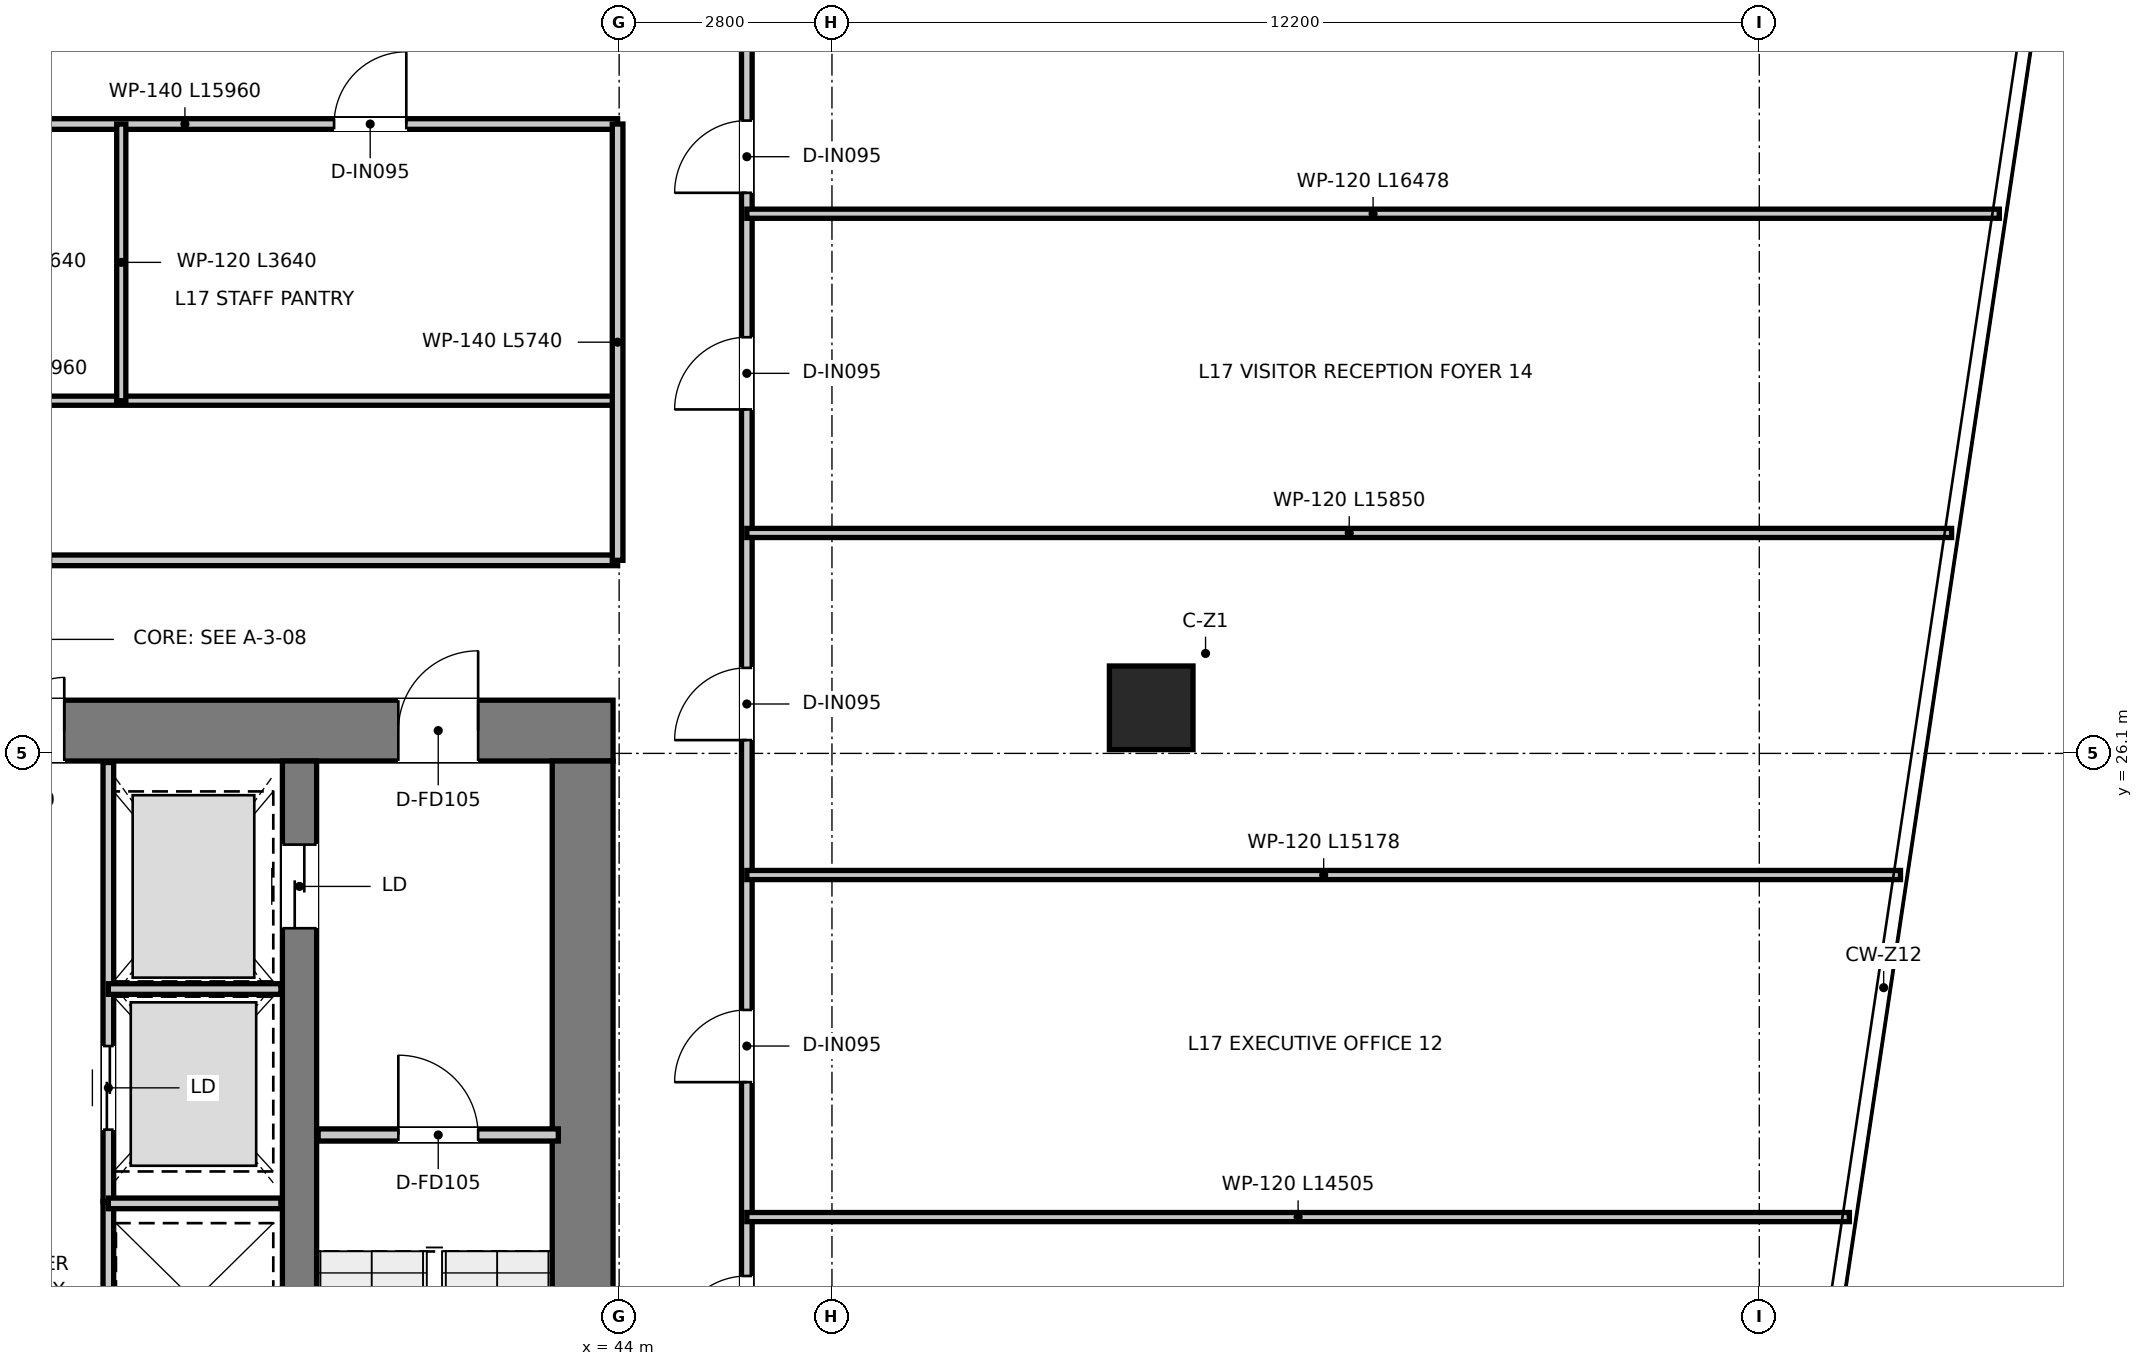
"""IFC4 building model, lengths in metres.
Left out: names, types, materials, properties, quantities, classifications, styles, units other than length and angle.
Written with IfcOpenShell. Run it as: python <this file> out.ifc"""

import sys

from ifc_helpers import new_model, si_unit, direction, frame, frame_2d, origin, origin_2d, place, context, subcontext, project, spatial, rectangle, extrude, source, transform, mapped, element, fill, save


model = new_model("IFC4")
c1 = context("Model", 3, precision=1e-05, world=origin(), true_north=direction((0.0, 1.0)))
c2 = subcontext(c1, "Body", "Model", "MODEL_VIEW")
j1 = project(units=[si_unit("LENGTHUNIT", "METRE"), si_unit("PLANEANGLEUNIT", "RADIAN")], contexts=[c1])
p1 = place(None, origin())
s1 = spatial("IfcSite", under=j1, at=p1, CompositionType="ELEMENT")
p2 = place(p1, origin())
s2 = spatial("IfcBuilding", under=s1, at=p2, CompositionType="ELEMENT")
p3 = place(p2, frame((0.0, 0.0, 72.4)))
s3 = spatial("IfcBuildingStorey", under=s2, at=p3, CompositionType="ELEMENT", Elevation=72.4)
p4 = place(p3, frame((28.08, 26.4, 0.0), z_axis=(0.0, 0.0, 1.0), x_axis=(1.0, 0.0, 0.0)))
e1 = element("IfcWall", 1, at=p4, inside=s3, PredefinedType="SHEAR", context=c2, shape_type="SweptSolid", body=[
    extrude(rectangle(XDim=15.84, YDim=0.8, at=frame_2d((7.92, 0.0))), origin(), (0.0, 0.0, 1.0), 3.95),
])
p5 = place(p4, frame((7.22, 0.0, 0.0)))
e2 = element("IfcOpeningElement", 2, at=p5, cuts=e1, PredefinedType="OPENING", context=c2, shape_type="SweptSolid", body=[
    extrude(rectangle(XDim=1.4, YDim=2.2, at=frame_2d((0.7, 1.1))), frame((0.0, 0.41, 0.0), z_axis=(0.0, -1.0, 0.0), x_axis=(1.0, 0.0, 0.0)), (0.0, 0.0, 1.0), 0.82),
])
p6 = place(p4, frame((1.775, 0.0, 0.0)))
e3 = element("IfcOpeningElement", 3, at=p6, cuts=e1, PredefinedType="OPENING", context=c2, shape_type="SweptSolid", body=[
    extrude(rectangle(XDim=1.05, YDim=2.1, at=frame_2d((0.525, 1.05))), frame((0.0, 0.41, 0.0), z_axis=(0.0, -1.0, 0.0), x_axis=(1.0, 0.0, 0.0)), (0.0, 0.0, 1.0), 0.82),
])
p7 = place(p4, frame((13.015, 0.0, 0.0)))
e4 = element("IfcOpeningElement", 4, at=p7, cuts=e1, PredefinedType="OPENING", context=c2, shape_type="SweptSolid", body=[
    extrude(rectangle(XDim=1.05, YDim=2.1, at=frame_2d((0.525, 1.05))), frame((0.0, 0.41, 0.0), z_axis=(0.0, -1.0, 0.0), x_axis=(1.0, 0.0, 0.0)), (0.0, 0.0, 1.0), 0.82),
])
p8 = place(p3, frame((43.52, 11.3, 0.0), z_axis=(0.0, 0.0, 1.0), x_axis=(0.0, 1.0, 0.0)))
e5 = element("IfcWall", 5, at=p8, inside=s3, PredefinedType="SHEAR", context=c2, shape_type="SweptSolid", body=[
    extrude(rectangle(XDim=14.7, YDim=0.8, at=frame_2d((7.35, 0.0))), origin(), (0.0, 0.0, 1.0), 3.95),
])
p9 = place(p3, frame((39.795, 13.22, 0.0), z_axis=(0.0, 0.0, 1.0), x_axis=(0.0, 1.0, 0.0)))
e6 = element("IfcWall", 6, at=p9, inside=s3, PredefinedType="SHEAR", context=c2, shape_type="SweptSolid", body=[
    extrude(rectangle(XDim=12.78, YDim=0.45, at=frame_2d((6.39, 0.0))), origin(), (0.0, 0.0, 1.0), 3.95),
])
p10 = place(p9, frame((10.58, 0.0, 0.0)))
e7 = element("IfcOpeningElement", 7, at=p10, cuts=e6, PredefinedType="OPENING", context=c2, shape_type="SweptSolid", body=[
    extrude(rectangle(XDim=1.1, YDim=2.15, at=frame_2d((0.55, 1.075))), frame((0.0, 0.235, 0.0), z_axis=(0.0, -1.0, 0.0), x_axis=(1.0, 0.0, 0.0)), (0.0, 0.0, 1.0), 0.47),
])
m1 = source(origin(), c2, "Body", "SweptSolid", [
    extrude(rectangle(XDim=1.1, YDim=1.1, at=origin_2d()), origin(), (0.0, 0.0, 1.0), 3.95),
])
p11 = place(p3, frame((51.0, 26.7, 0.0), z_axis=(0.0, 0.0, 1.0), x_axis=(1.0, 0.0, 0.0)))
e8 = element("IfcColumn", 8, at=p11, inside=s3, PredefinedType="COLUMN", context=c2, shape_type="MappedRepresentation", body=[
    mapped(m1, transform((0.0, 0.0, 0.0), x_axis=(1.0, 0.0, 0.0), y_axis=(0.0, 1.0, 0.0), z_axis=(0.0, 0.0, 1.0), scale=1.0)),
])
p12 = place(p3, frame((40.04, 21.08, 0.0), z_axis=(0.0, 0.0, 1.0), x_axis=(1.0, 0.0, 0.0)))
e9 = element("IfcWall", 9, at=p12, inside=s3, PredefinedType="PARTITIONING", context=c2, shape_type="SweptSolid", body=[
    extrude(rectangle(XDim=3.16, YDim=0.16, at=frame_2d((1.58, 0.0))), origin(), (0.0, 0.0, 1.0), 3.67),
])
p13 = place(p12, frame((1.055, 0.0, 0.0)))
e10 = element("IfcOpeningElement", 10, at=p13, cuts=e9, PredefinedType="OPENING", context=c2, shape_type="SweptSolid", body=[
    extrude(rectangle(XDim=1.05, YDim=2.1, at=frame_2d((0.525, 1.05))), frame((0.0, 0.09, 0.0), z_axis=(0.0, -1.0, 0.0), x_axis=(1.0, 0.0, 0.0)), (0.0, 0.0, 1.0), 0.18),
])
p14 = place(p3, frame((37.28, 20.2, 0.0), z_axis=(0.0, 0.0, 1.0), x_axis=(0.0, 1.0, 0.0)))
e11 = element("IfcWall", 11, at=p14, inside=s3, PredefinedType="PARTITIONING", context=c2, shape_type="SweptSolid", body=[
    extrude(rectangle(XDim=5.78, YDim=0.14, at=frame_2d((2.89, 0.0))), origin(), (0.0, 0.0, 1.0), 2.47),
])
p15 = place(p14, frame((0.95, 0.0, 0.0)))
e12 = element("IfcOpeningElement", 12, at=p15, cuts=e11, PredefinedType="OPENING", context=c2, shape_type="SweptSolid", body=[
    extrude(rectangle(XDim=1.1, YDim=2.15, at=frame_2d((0.55, 1.075))), frame((0.0, 0.08, 0.0), z_axis=(0.0, -1.0, 0.0), x_axis=(1.0, 0.0, 0.0)), (0.0, 0.0, 1.0), 0.16),
])
p16 = place(p3, frame((37.28, 23.0, 0.0), z_axis=(0.0, 0.0, 1.0), x_axis=(1.0, 0.0, 0.0)))
e13 = element("IfcWall", 13, at=p16, inside=s3, PredefinedType="PARTITIONING", context=c2, shape_type="SweptSolid", body=[
    extrude(rectangle(XDim=2.27, YDim=0.14, at=frame_2d((1.135, 0.0))), origin(), (0.0, 0.0, 1.0), 2.47),
])
p17 = place(p3, frame((37.28, 17.78, 0.0), z_axis=(0.0, 0.0, 1.0), x_axis=(0.0, 1.0, 0.0)))
e14 = element("IfcWall", 14, at=p17, inside=s3, PredefinedType="PARTITIONING", context=c2, shape_type="SweptSolid", body=[
    extrude(rectangle(XDim=2.42, YDim=0.14, at=frame_2d((1.21, 0.0))), origin(), (0.0, 0.0, 1.0), 3.67),
])
p18 = place(p3, frame((37.28, 20.18, 0.0), z_axis=(0.0, 0.0, 1.0), x_axis=(1.0, 0.0, 0.0)))
e15 = element("IfcWall", 15, at=p18, inside=s3, PredefinedType="PARTITIONING", context=c2, shape_type="SweptSolid", body=[
    extrude(rectangle(XDim=2.27, YDim=0.14, at=frame_2d((1.135, 0.0))), origin(), (0.0, 0.0, 1.0), 3.67),
])
p19 = place(p3, frame((28.02, 28.64, 0.0), z_axis=(0.0, 0.0, 1.0), x_axis=(1.0, 0.0, 0.0)))
e16 = element("IfcWall", 16, at=p19, inside=s3, PredefinedType="PARTITIONING", context=c2, shape_type="SweptSolid", body=[
    extrude(rectangle(XDim=15.96, YDim=0.14, at=frame_2d((7.98, 0.0))), origin(), (0.0, 0.0, 1.0), 3.08),
])
p20 = place(p19, frame((7.455, 0.0, 0.0)))
e17 = element("IfcOpeningElement", 17, at=p20, cuts=e16, PredefinedType="OPENING", context=c2, shape_type="SweptSolid", body=[
    extrude(rectangle(XDim=1.05, YDim=2.15, at=frame_2d((0.525, 1.075))), frame((0.0, 0.08, 0.0), z_axis=(0.0, -1.0, 0.0), x_axis=(1.0, 0.0, 0.0)), (0.0, 0.0, 1.0), 0.16),
])
p21 = place(p3, frame((28.02, 30.74, 0.0), z_axis=(0.0, 0.0, 1.0), x_axis=(1.0, 0.0, 0.0)))
e18 = element("IfcWall", 18, at=p21, inside=s3, PredefinedType="PARTITIONING", context=c2, shape_type="SweptSolid", body=[
    extrude(rectangle(XDim=15.96, YDim=0.12, at=frame_2d((7.98, 0.0))), origin(), (0.0, 0.0, 1.0), 3.08),
])
p22 = place(p3, frame((28.02, 34.38, 0.0), z_axis=(0.0, 0.0, 1.0), x_axis=(1.0, 0.0, 0.0)))
e19 = element("IfcWall", 19, at=p22, inside=s3, PredefinedType="PARTITIONING", context=c2, shape_type="SweptSolid", body=[
    extrude(rectangle(XDim=15.96, YDim=0.14, at=frame_2d((7.98, 0.0))), origin(), (0.0, 0.0, 1.0), 3.08),
])
p23 = place(p22, frame((1.13, 0.0, 0.0)))
e20 = element("IfcOpeningElement", 20, at=p23, cuts=e19, PredefinedType="OPENING", context=c2, shape_type="SweptSolid", body=[
    extrude(rectangle(XDim=0.9, YDim=2.1, at=frame_2d((0.45, 1.05))), frame((0.0, 0.08, 0.0), z_axis=(0.0, -1.0, 0.0), x_axis=(1.0, 0.0, 0.0)), (0.0, 0.0, 1.0), 0.16),
])
p24 = place(p22, frame((4.33, 0.0, 0.0)))
e21 = element("IfcOpeningElement", 21, at=p24, cuts=e19, PredefinedType="OPENING", context=c2, shape_type="SweptSolid", body=[
    extrude(rectangle(XDim=0.9, YDim=2.1, at=frame_2d((0.45, 1.05))), frame((0.0, 0.08, 0.0), z_axis=(0.0, -1.0, 0.0), x_axis=(1.0, 0.0, 0.0)), (0.0, 0.0, 1.0), 0.16),
])
p25 = place(p22, frame((7.355, 0.0, 0.0)))
e22 = element("IfcOpeningElement", 22, at=p25, cuts=e19, PredefinedType="OPENING", context=c2, shape_type="SweptSolid", body=[
    extrude(rectangle(XDim=0.95, YDim=2.1, at=frame_2d((0.475, 1.05))), frame((0.0, 0.08, 0.0), z_axis=(0.0, -1.0, 0.0), x_axis=(1.0, 0.0, 0.0)), (0.0, 0.0, 1.0), 0.16),
])
p26 = place(p22, frame((12.23, 0.0, 0.0)))
e23 = element("IfcOpeningElement", 23, at=p26, cuts=e19, PredefinedType="OPENING", context=c2, shape_type="SweptSolid", body=[
    extrude(rectangle(XDim=0.95, YDim=2.1, at=frame_2d((0.475, 1.05))), frame((0.0, 0.08, 0.0), z_axis=(0.0, -1.0, 0.0), x_axis=(1.0, 0.0, 0.0)), (0.0, 0.0, 1.0), 0.16),
])
p27 = place(p3, frame((43.98, 28.64, 0.0), z_axis=(0.0, 0.0, 1.0), x_axis=(0.0, 1.0, 0.0)))
e24 = element("IfcWall", 24, at=p27, inside=s3, PredefinedType="PARTITIONING", context=c2, shape_type="SweptSolid", body=[
    extrude(rectangle(XDim=5.74, YDim=0.14, at=frame_2d((2.87, 0.0))), origin(), (0.0, 0.0, 1.0), 3.22),
])
p28 = place(p3, frame((37.45, 30.74, 0.0), z_axis=(0.0, 0.0, 1.0), x_axis=(0.0, 1.0, 0.0)))
e25 = element("IfcWall", 25, at=p28, inside=s3, PredefinedType="PARTITIONING", context=c2, shape_type="SweptSolid", body=[
    extrude(rectangle(XDim=3.64, YDim=0.12, at=frame_2d((1.82, 0.0))), origin(), (0.0, 0.0, 1.0), 3.12),
])
p29 = place(p3, frame((45.68, 10.5, 0.0), z_axis=(0.0, 0.0, 1.0), x_axis=(0.0, 1.0, 0.0)))
e26 = element("IfcWall", 26, at=p29, inside=s3, PredefinedType="PARTITIONING", context=c2, shape_type="SweptSolid", body=[
    extrude(rectangle(XDim=25.62, YDim=0.14, at=frame_2d((12.81, 0.0))), origin(), (0.0, 0.0, 1.0), 2.97),
])
p30 = place(p29, frame((7.775, 0.0, 0.0)))
e27 = element("IfcOpeningElement", 27, at=p30, cuts=e26, PredefinedType="OPENING", context=c2, shape_type="SweptSolid", body=[
    extrude(rectangle(XDim=0.95, YDim=2.1, at=frame_2d((0.475, 1.05))), frame((0.0, 0.08, 0.0), z_axis=(0.0, -1.0, 0.0), x_axis=(1.0, 0.0, 0.0)), (0.0, 0.0, 1.0), 0.16),
])
p31 = place(p29, frame((11.275, 0.0, 0.0)))
e28 = element("IfcOpeningElement", 28, at=p31, cuts=e26, PredefinedType="OPENING", context=c2, shape_type="SweptSolid", body=[
    extrude(rectangle(XDim=0.95, YDim=2.1, at=frame_2d((0.475, 1.05))), frame((0.0, 0.08, 0.0), z_axis=(0.0, -1.0, 0.0), x_axis=(1.0, 0.0, 0.0)), (0.0, 0.0, 1.0), 0.16),
])
p32 = place(p29, frame((15.775, 0.0, 0.0)))
e29 = element("IfcOpeningElement", 29, at=p32, cuts=e26, PredefinedType="OPENING", context=c2, shape_type="SweptSolid", body=[
    extrude(rectangle(XDim=0.95, YDim=2.1, at=frame_2d((0.475, 1.05))), frame((0.0, 0.08, 0.0), z_axis=(0.0, -1.0, 0.0), x_axis=(1.0, 0.0, 0.0)), (0.0, 0.0, 1.0), 0.16),
])
p33 = place(p29, frame((20.125, 0.0, 0.0)))
e30 = element("IfcOpeningElement", 30, at=p33, cuts=e26, PredefinedType="OPENING", context=c2, shape_type="SweptSolid", body=[
    extrude(rectangle(XDim=0.95, YDim=2.1, at=frame_2d((0.475, 1.05))), frame((0.0, 0.08, 0.0), z_axis=(0.0, -1.0, 0.0), x_axis=(1.0, 0.0, 0.0)), (0.0, 0.0, 1.0), 0.16),
])
p34 = place(p29, frame((22.975, 0.0, 0.0)))
e31 = element("IfcOpeningElement", 31, at=p34, cuts=e26, PredefinedType="OPENING", context=c2, shape_type="SweptSolid", body=[
    extrude(rectangle(XDim=0.95, YDim=2.1, at=frame_2d((0.475, 1.05))), frame((0.0, 0.08, 0.0), z_axis=(0.0, -1.0, 0.0), x_axis=(1.0, 0.0, 0.0)), (0.0, 0.0, 1.0), 0.16),
])
p35 = place(p3, frame((45.68, 20.0, 0.0), z_axis=(0.0, 0.0, 1.0), x_axis=(1.0, 0.0, 0.0)))
e32 = element("IfcWall", 32, at=p35, inside=s3, PredefinedType="PARTITIONING", context=c2, shape_type="SweptSolid", body=[
    extrude(rectangle(XDim=14.505, YDim=0.12, at=frame_2d((7.253, 0.0))), origin(), (0.0, 0.0, 1.0), 2.97),
])
p36 = place(p3, frame((45.68, 24.5, 0.0), z_axis=(0.0, 0.0, 1.0), x_axis=(1.0, 0.0, 0.0)))
e33 = element("IfcWall", 33, at=p36, inside=s3, PredefinedType="PARTITIONING", context=c2, shape_type="SweptSolid", body=[
    extrude(rectangle(XDim=15.178, YDim=0.12, at=frame_2d((7.589, 0.0))), origin(), (0.0, 0.0, 1.0), 2.97),
])
p37 = place(p3, frame((45.68, 29.0, 0.0), z_axis=(0.0, 0.0, 1.0), x_axis=(1.0, 0.0, 0.0)))
e34 = element("IfcWall", 34, at=p37, inside=s3, PredefinedType="PARTITIONING", context=c2, shape_type="SweptSolid", body=[
    extrude(rectangle(XDim=15.851, YDim=0.12, at=frame_2d((7.925, 0.0))), origin(), (0.0, 0.0, 1.0), 2.97),
])
p38 = place(p3, frame((45.68, 33.2, 0.0), z_axis=(0.0, 0.0, 1.0), x_axis=(1.0, 0.0, 0.0)))
e35 = element("IfcWall", 35, at=p38, inside=s3, PredefinedType="PARTITIONING", context=c2, shape_type="SweptSolid", body=[
    extrude(rectangle(XDim=16.478, YDim=0.12, at=frame_2d((8.239, 0.0))), origin(), (0.0, 0.0, 1.0), 2.97),
])
p39 = place(p13, origin())
e36 = element("IfcDoor", 36, at=p39, inside=s3, OperationType="SINGLE_SWING_LEFT", PredefinedType="DOOR", context=c2, shape_type="SweptSolid", body=[
    extrude(rectangle(XDim=1.05, YDim=2.1, at=frame_2d((0.525, 1.05))), frame((0.0, 0.025, 0.0), z_axis=(0.0, -1.0, 0.0), x_axis=(1.0, 0.0, 0.0)), (0.0, 0.0, 1.0), 0.05),
])
fill(e10, e36)
p40 = place(p5, origin())
e37 = element("IfcDoor", 37, at=p40, inside=s3, OperationType="DOUBLE_DOOR_SINGLE_SWING", PredefinedType="DOOR", context=c2, shape_type="SweptSolid", body=[
    extrude(rectangle(XDim=1.4, YDim=2.2, at=frame_2d((0.7, 1.1))), frame((0.0, 0.025, 0.0), z_axis=(0.0, -1.0, 0.0), x_axis=(1.0, 0.0, 0.0)), (0.0, 0.0, 1.0), 0.05),
])
fill(e2, e37)
p41 = place(p7, origin())
e38 = element("IfcDoor", 38, at=p41, inside=s3, OperationType="SINGLE_SWING_RIGHT", PredefinedType="DOOR", context=c2, shape_type="SweptSolid", body=[
    extrude(rectangle(XDim=1.05, YDim=2.1, at=frame_2d((0.525, 1.05))), frame((0.0, 0.025, 0.0), z_axis=(0.0, -1.0, 0.0), x_axis=(1.0, 0.0, 0.0)), (0.0, 0.0, 1.0), 0.05),
])
fill(e4, e38)
p42 = place(p10, origin())
e39 = element("IfcDoor", 39, at=p42, inside=s3, OperationType="DOUBLE_DOOR_SLIDING", PredefinedType="DOOR", context=c2, shape_type="SweptSolid", body=[
    extrude(rectangle(XDim=1.1, YDim=2.15, at=frame_2d((0.55, 1.075))), frame((0.0, 0.025, 0.0), z_axis=(0.0, -1.0, 0.0), x_axis=(1.0, 0.0, 0.0)), (0.0, 0.0, 1.0), 0.05),
])
fill(e7, e39)
p43 = place(p15, origin())
e40 = element("IfcDoor", 40, at=p43, inside=s3, OperationType="DOUBLE_DOOR_SLIDING", PredefinedType="DOOR", context=c2, shape_type="SweptSolid", body=[
    extrude(rectangle(XDim=1.1, YDim=2.15, at=frame_2d((0.55, 1.075))), frame((0.0, 0.025, 0.0), z_axis=(0.0, -1.0, 0.0), x_axis=(1.0, 0.0, 0.0)), (0.0, 0.0, 1.0), 0.05),
])
fill(e12, e40)
p44 = place(p26, origin())
e41 = element("IfcDoor", 41, at=p44, inside=s3, OperationType="SINGLE_SWING_RIGHT", PredefinedType="DOOR", context=c2, shape_type="SweptSolid", body=[
    extrude(rectangle(XDim=0.95, YDim=2.1, at=frame_2d((0.475, 1.05))), frame((0.0, 0.025, 0.0), z_axis=(0.0, -1.0, 0.0), x_axis=(1.0, 0.0, 0.0)), (0.0, 0.0, 1.0), 0.05),
])
fill(e23, e41)
p45 = place(p30, origin())
e42 = element("IfcDoor", 42, at=p45, inside=s3, OperationType="SINGLE_SWING_LEFT", PredefinedType="DOOR", context=c2, shape_type="SweptSolid", body=[
    extrude(rectangle(XDim=0.95, YDim=2.1, at=frame_2d((0.475, 1.05))), frame((0.0, 0.025, 0.0), z_axis=(0.0, -1.0, 0.0), x_axis=(1.0, 0.0, 0.0)), (0.0, 0.0, 1.0), 0.05),
])
fill(e27, e42)
p46 = place(p31, origin())
e43 = element("IfcDoor", 43, at=p46, inside=s3, OperationType="SINGLE_SWING_LEFT", PredefinedType="DOOR", context=c2, shape_type="SweptSolid", body=[
    extrude(rectangle(XDim=0.95, YDim=2.1, at=frame_2d((0.475, 1.05))), frame((0.0, 0.025, 0.0), z_axis=(0.0, -1.0, 0.0), x_axis=(1.0, 0.0, 0.0)), (0.0, 0.0, 1.0), 0.05),
])
fill(e28, e43)
p47 = place(p32, origin())
e44 = element("IfcDoor", 44, at=p47, inside=s3, OperationType="SINGLE_SWING_LEFT", PredefinedType="DOOR", context=c2, shape_type="SweptSolid", body=[
    extrude(rectangle(XDim=0.95, YDim=2.1, at=frame_2d((0.475, 1.05))), frame((0.0, 0.025, 0.0), z_axis=(0.0, -1.0, 0.0), x_axis=(1.0, 0.0, 0.0)), (0.0, 0.0, 1.0), 0.05),
])
fill(e29, e44)
p48 = place(p33, origin())
e45 = element("IfcDoor", 45, at=p48, inside=s3, OperationType="SINGLE_SWING_LEFT", PredefinedType="DOOR", context=c2, shape_type="SweptSolid", body=[
    extrude(rectangle(XDim=0.95, YDim=2.1, at=frame_2d((0.475, 1.05))), frame((0.0, 0.025, 0.0), z_axis=(0.0, -1.0, 0.0), x_axis=(1.0, 0.0, 0.0)), (0.0, 0.0, 1.0), 0.05),
])
fill(e30, e45)
p49 = place(p34, origin())
e46 = element("IfcDoor", 46, at=p49, inside=s3, OperationType="SINGLE_SWING_LEFT", PredefinedType="DOOR", context=c2, shape_type="SweptSolid", body=[
    extrude(rectangle(XDim=0.95, YDim=2.1, at=frame_2d((0.475, 1.05))), frame((0.0, 0.025, 0.0), z_axis=(0.0, -1.0, 0.0), x_axis=(1.0, 0.0, 0.0)), (0.0, 0.0, 1.0), 0.05),
])
fill(e31, e46)
save(model, sys.argv[1])
